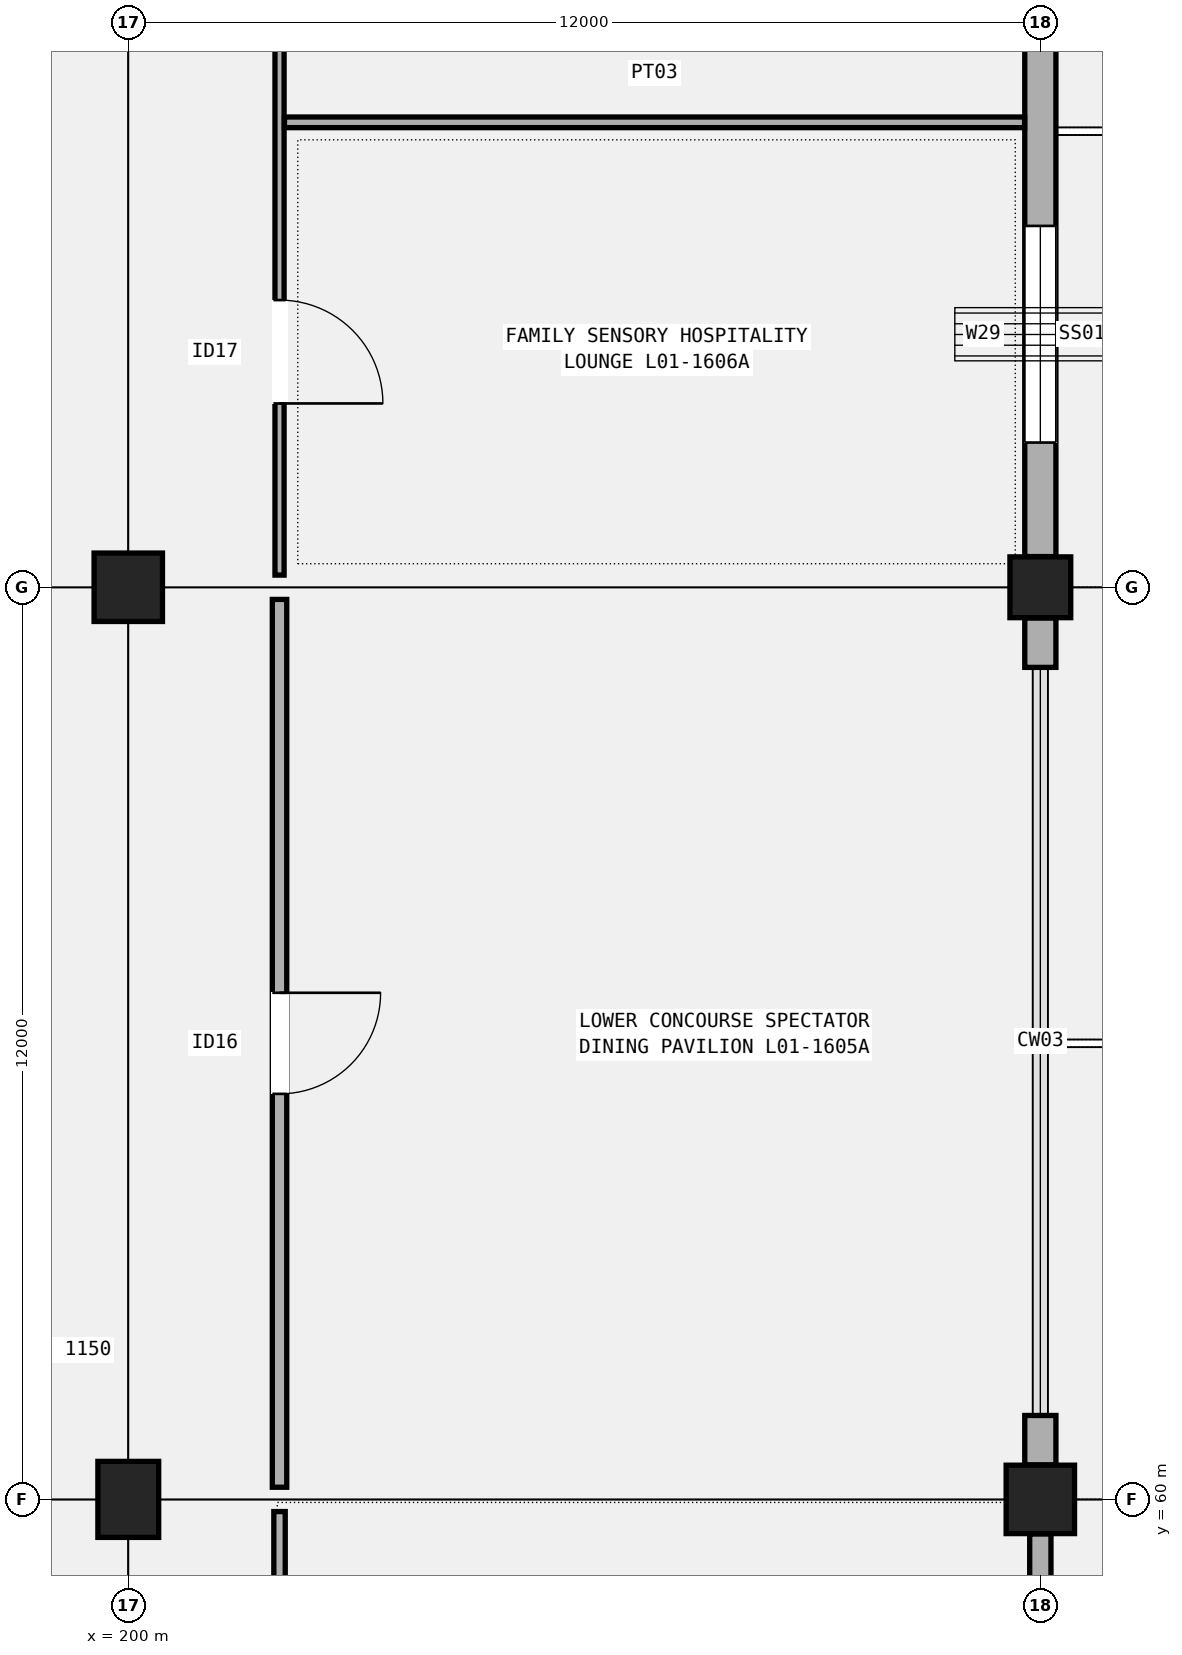
"""IFC4 building model, lengths in metres.
Left out: names, types, materials, properties, quantities, classifications, styles, units other than length and angle.
Written with IfcOpenShell. Run it as: python <this file> out.ifc"""

import sys

from ifc_helpers import new_model, si_unit, direction, frame, frame_2d, origin, origin_2d, place, context, subcontext, project, spatial, rectangle, extrude, element, fill, save


model = new_model("IFC4")
c1 = context("Model", 3, precision=1e-05, world=origin(), true_north=direction((0.0, 1.0)))
c2 = subcontext(c1, "Body", "Model", "MODEL_VIEW")
j1 = project(units=[si_unit("LENGTHUNIT", "METRE"), si_unit("PLANEANGLEUNIT", "RADIAN")], contexts=[c1])
p1 = place(None, origin())
s1 = spatial("IfcSite", under=j1, at=p1, CompositionType="ELEMENT")
p2 = place(p1, origin())
s2 = spatial("IfcBuilding", under=s1, at=p2, CompositionType="ELEMENT")
p3 = place(p2, frame((0.0, 0.0, 5.4)))
s3 = spatial("IfcBuildingStorey", under=s2, at=p3, CompositionType="ELEMENT", Elevation=5.4)
p4 = place(p3, frame((200.0, 60.0, 0.0), z_axis=(0.0, 0.0, 1.0), x_axis=(1.0, 0.0, 0.0)))
e1 = element("IfcColumn", 1, at=p4, inside=s3, PredefinedType="COLUMN", context=c2, shape_type="SweptSolid", body=[
    extrude(rectangle(XDim=0.8, YDim=1.0, at=origin_2d()), origin(), (0.0, 0.0, 1.0), 4.8),
])
for number, where, z_axis, x_axis in (
    (2, (200.0, 72.0, 0.0), (0.0, 0.0, 1.0), (1.0, 0.0, 0.0)),
    (3, (212.0, 60.0, 0.0), (0.0, 0.0, 1.0), (1.0, 0.0, 0.0)),
):
    element("IfcColumn", number, at=place(p3, frame(where, z_axis=z_axis, x_axis=x_axis)), inside=s3, PredefinedType="COLUMN", context=c2, shape_type="SweptSolid", body=[
        extrude(rectangle(XDim=0.9, YDim=0.9, at=origin_2d()), origin(), (0.0, 0.0, 1.0), 4.8),
    ])
p5 = place(p3, frame((212.0, 72.0, 0.0), z_axis=(0.0, 0.0, 1.0), x_axis=(1.0, 0.0, 0.0)))
e4 = element("IfcColumn", 4, at=p5, inside=s3, PredefinedType="COLUMN", context=c2, shape_type="SweptSolid", body=[
    extrude(rectangle(XDim=0.8, YDim=0.8, at=origin_2d()), origin(), (0.0, 0.0, 1.0), 4.8),
])
p6 = place(p3, frame((212.0, 48.504, 0.0), z_axis=(0.0, 0.0, 1.0), x_axis=(0.0, 1.0, 0.0)))
e5 = element("IfcWall", 5, at=p6, inside=s3, PredefinedType="SOLIDWALL", context=c2, shape_type="SweptSolid", body=[
    extrude(rectangle(XDim=11.042, YDim=0.28, at=frame_2d((5.521, 0.0))), origin(), (0.0, 0.0, 1.0), 4.2),
])
p7 = place(p6, frame((1.5, 0.0, 0.95)))
e6 = element("IfcOpeningElement", 6, at=p7, cuts=e5, PredefinedType="OPENING", context=c2, shape_type="SweptSolid", body=[
    extrude(rectangle(XDim=2.7, YDim=2.2, at=frame_2d((1.35, 1.1))), frame((0.0, 0.15, 0.0), z_axis=(0.0, -1.0, 0.0), x_axis=(1.0, 0.0, 0.0)), (0.0, 0.0, 1.0), 0.3),
])
for number, where, z_axis, x_axis in (
    (7, (212.0, 60.454, 0.0), (0.0, 0.0, 1.0), (0.0, 1.0, 0.0)),
    (8, (212.0, 70.946, 0.0), (0.0, 0.0, 1.0), (0.0, 1.0, 0.0)),
):
    element("IfcWall", number, at=place(p3, frame(where, z_axis=z_axis, x_axis=x_axis)), inside=s3, PredefinedType="SOLIDWALL", context=c2, shape_type="SweptSolid", body=[
        extrude(rectangle(XDim=0.65, YDim=0.41, at=frame_2d((0.325, 0.0))), origin(), (0.0, 0.0, 1.0), 4.15),
    ])
p8 = place(p3, frame((212.0, 72.404, 0.0), z_axis=(0.0, 0.0, 1.0), x_axis=(0.0, 1.0, 0.0)))
e9 = element("IfcWall", 9, at=p8, inside=s3, PredefinedType="SOLIDWALL", context=c2, shape_type="SweptSolid", body=[
    extrude(rectangle(XDim=11.092, YDim=0.41, at=frame_2d((5.546, 0.0))), origin(), (0.0, 0.0, 1.0), 4.2),
])
p9 = place(p8, frame((1.5, 0.0, 0.95)))
e10 = element("IfcOpeningElement", 10, at=p9, cuts=e9, PredefinedType="OPENING", context=c2, shape_type="SweptSolid", body=[
    extrude(rectangle(XDim=2.85, YDim=2.0, at=frame_2d((1.425, 1.0))), frame((0.0, 0.215, 0.0), z_axis=(0.0, -1.0, 0.0), x_axis=(1.0, 0.0, 0.0)), (0.0, 0.0, 1.0), 0.43),
])
p10 = place(p3, frame((201.99, 48.16, 0.0), z_axis=(0.0, 0.0, 1.0), x_axis=(0.0, 1.0, 0.0)))
e11 = element("IfcWall", 11, at=p10, inside=s3, PredefinedType="PARTITIONING", context=c2, shape_type="SweptSolid", body=[
    extrude(rectangle(XDim=11.68, YDim=0.15, at=frame_2d((5.84, 0.0))), origin(), (0.0, 0.0, 1.0), 3.92),
])
p11 = place(p10, frame((6.49, 0.0, 0.0), z_axis=(0.0, 0.0, 1.0), x_axis=(-1.0, 0.0, 0.0)))
e12 = element("IfcOpeningElement", 12, at=p11, cuts=e11, PredefinedType="OPENING", context=c2, shape_type="SweptSolid", body=[
    extrude(rectangle(XDim=1.3, YDim=2.24, at=frame_2d((0.65, 1.12))), frame((0.0, 0.085, 0.0), z_axis=(0.0, -1.0, 0.0), x_axis=(1.0, 0.0, 0.0)), (0.0, 0.0, 1.0), 0.17),
])
p12 = place(p3, frame((201.99, 60.16, 0.0), z_axis=(0.0, 0.0, 1.0), x_axis=(0.0, 1.0, 0.0)))
e13 = element("IfcWall", 13, at=p12, inside=s3, PredefinedType="PARTITIONING", context=c2, shape_type="SweptSolid", body=[
    extrude(rectangle(XDim=11.68, YDim=0.19, at=frame_2d((5.84, 0.0))), origin(), (0.0, 0.0, 1.0), 3.92),
])
p13 = place(p12, frame((6.505, 0.0, 0.0), z_axis=(0.0, 0.0, 1.0), x_axis=(-1.0, 0.0, 0.0)))
e14 = element("IfcOpeningElement", 14, at=p13, cuts=e13, PredefinedType="OPENING", context=c2, shape_type="SweptSolid", body=[
    extrude(rectangle(XDim=1.33, YDim=2.22, at=frame_2d((0.665, 1.11))), frame((0.0, 0.105, 0.0), z_axis=(0.0, -1.0, 0.0), x_axis=(1.0, 0.0, 0.0)), (0.0, 0.0, 1.0), 0.21),
])
p14 = place(p3, frame((201.99, 72.16, 0.0), z_axis=(0.0, 0.0, 1.0), x_axis=(0.0, 1.0, 0.0)))
e15 = element("IfcWall", 15, at=p14, inside=s3, PredefinedType="PARTITIONING", context=c2, shape_type="SweptSolid", body=[
    extrude(rectangle(XDim=11.68, YDim=0.12, at=frame_2d((5.84, 0.0))), origin(), (0.0, 0.0, 1.0), 3.92),
])
p15 = place(p14, frame((3.618, 0.0, 0.0), z_axis=(0.0, 0.0, 1.0), x_axis=(-1.0, 0.0, 0.0)))
e16 = element("IfcOpeningElement", 16, at=p15, cuts=e15, PredefinedType="OPENING", context=c2, shape_type="SweptSolid", body=[
    extrude(rectangle(XDim=1.36, YDim=2.25, at=frame_2d((0.68, 1.125))), frame((0.0, 0.07, 0.0), z_axis=(0.0, -1.0, 0.0), x_axis=(1.0, 0.0, 0.0)), (0.0, 0.0, 1.0), 0.14),
])
p16 = place(p14, frame((9.558, 0.0, 0.0), z_axis=(0.0, 0.0, 1.0), x_axis=(-1.0, 0.0, 0.0)))
e17 = element("IfcOpeningElement", 17, at=p16, cuts=e15, PredefinedType="OPENING", context=c2, shape_type="SweptSolid", body=[
    extrude(rectangle(XDim=1.4, YDim=2.24, at=frame_2d((0.7, 1.12))), frame((0.0, 0.07, 0.0), z_axis=(0.0, -1.0, 0.0), x_axis=(1.0, 0.0, 0.0)), (0.0, 0.0, 1.0), 0.14),
])
p17 = place(p3, frame((202.055, 78.117, 0.0), z_axis=(0.0, 0.0, 1.0), x_axis=(1.0, 0.0, 0.0)))
e18 = element("IfcWall", 18, at=p17, inside=s3, PredefinedType="PARTITIONING", context=c2, shape_type="SweptSolid", body=[
    extrude(rectangle(XDim=9.738, YDim=0.14, at=frame_2d((4.869, 0.0))), origin(), (0.0, 0.0, 1.0), 3.92),
])
p18 = place(p9, origin())
e19 = element("IfcWindow", 19, at=p18, inside=s3, PartitioningType="SINGLE_PANEL", PredefinedType="WINDOW", context=c2, shape_type="SweptSolid", body=[
    extrude(rectangle(XDim=2.85, YDim=2.0, at=frame_2d((1.425, 1.0))), frame((0.0, 0.03, 0.0), z_axis=(0.0, -1.0, 0.0), x_axis=(1.0, 0.0, 0.0)), (0.0, 0.0, 1.0), 0.06),
])
fill(e10, e19)
p19 = place(p13, origin())
e20 = element("IfcDoor", 20, at=p19, inside=s3, OperationType="SINGLE_SWING_LEFT", PredefinedType="DOOR", context=c2, shape_type="SweptSolid", body=[
    extrude(rectangle(XDim=1.33, YDim=2.22, at=frame_2d((0.665, 1.11))), frame((0.0, 0.025, 0.0), z_axis=(0.0, -1.0, 0.0), x_axis=(1.0, 0.0, 0.0)), (0.0, 0.0, 1.0), 0.05),
])
fill(e14, e20)
p20 = place(p15, origin())
e21 = element("IfcDoor", 21, at=p20, inside=s3, OperationType="SINGLE_SWING_RIGHT", PredefinedType="DOOR", context=c2, shape_type="SweptSolid", body=[
    extrude(rectangle(XDim=1.36, YDim=2.25, at=frame_2d((0.68, 1.125))), frame((0.0, 0.025, 0.0), z_axis=(0.0, -1.0, 0.0), x_axis=(1.0, 0.0, 0.0)), (0.0, 0.0, 1.0), 0.05),
])
fill(e16, e21)
save(model, sys.argv[1])
